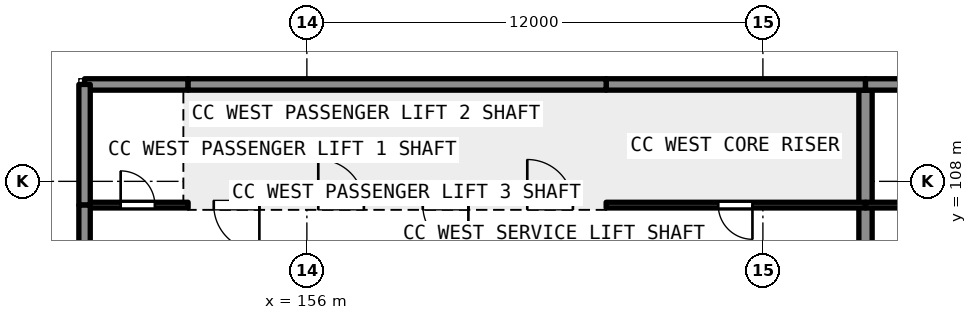
"""IFC4 building model, lengths in metres.
Left out: names, types, materials, properties, quantities, classifications, styles, units other than length and angle.
Written with IfcOpenShell. Run it as: python <this file> out.ifc"""

import sys

from ifc_helpers import new_model, si_unit, direction, frame, frame_2d, origin, place, context, subcontext, project, spatial, rectangle, extrude, element, fill, save


model = new_model("IFC4")
c1 = context("Model", 3, precision=1e-05, world=origin(), true_north=direction((0.0, 1.0)))
c2 = subcontext(c1, "Body", "Model", "MODEL_VIEW")
j1 = project(units=[si_unit("LENGTHUNIT", "METRE"), si_unit("PLANEANGLEUNIT", "RADIAN")], contexts=[c1])
p1 = place(None, origin())
s1 = spatial("IfcSite", under=j1, at=p1, CompositionType="ELEMENT")
p2 = place(p1, origin())
s2 = spatial("IfcBuilding", under=s1, at=p2, CompositionType="ELEMENT")
p3 = place(p2, frame((0.0, 0.0, 15.0)))
s3 = spatial("IfcBuildingStorey", under=s2, at=p3, CompositionType="ELEMENT", Elevation=15.0)
p4 = place(p3, frame((170.7, 103.15, 0.0), z_axis=(0.0, 0.0, 1.0), x_axis=(0.0, 1.0, 0.0)))
e1 = element("IfcWall", 1, at=p4, inside=s3, PredefinedType="SHEAR", context=c2, shape_type="SweptSolid", body=[
    extrude(rectangle(XDim=7.25, YDim=0.35, at=frame_2d((3.625, 0.0))), origin(), (0.0, 0.0, 1.0), 4.99),
])
p5 = place(p4, frame((1.2, 0.0, 0.0)))
e2 = element("IfcOpeningElement", 2, at=p5, cuts=e1, PredefinedType="OPENING", context=c2, shape_type="SweptSolid", body=[
    extrude(rectangle(XDim=1.8, YDim=2.1, at=frame_2d((0.9, 1.05))), frame((0.0, 0.186, 0.0), z_axis=(0.0, -1.0, 0.0), x_axis=(1.0, 0.0, 0.0)), (0.0, 0.0, 1.0), 0.371),
])
p6 = place(p2, origin())
s4 = spatial("IfcBuildingStorey", under=s2, at=p6, CompositionType="ELEMENT", Elevation=0.0)
for number, where, z_axis, x_axis in (
    (3, (152.875, 107.375, -1.2), (0.0, 0.0, 1.0), (0.0, 1.0, 0.0)),
    (4, (155.625, 107.375, -1.2), (0.0, 0.0, 1.0), (0.0, 1.0, 0.0)),
    (5, (158.375, 107.375, -1.2), (0.0, 0.0, 1.0), (0.0, 1.0, 0.0)),
    (6, (161.125, 107.375, -1.2), (0.0, 0.0, 1.0), (0.0, 1.0, 0.0)),
    (7, (163.875, 107.375, -1.2), (0.0, 0.0, 1.0), (0.0, 1.0, 0.0)),
):
    element("IfcWall", number, at=place(p6, frame(where, z_axis=z_axis, x_axis=x_axis)), inside=s4, PredefinedType="SHEAR", context=c2, shape_type="SweptSolid", body=[
        extrude(rectangle(XDim=3.025, YDim=0.25, at=frame_2d((1.512, 0.0))), origin(), (0.0, 0.0, 1.0), 30.79),
    ])
p7 = place(p6, frame((163.875, 107.375, -1.2), z_axis=(0.0, 0.0, 1.0), x_axis=(-1.0, 0.0, 0.0)))
e8 = element("IfcWall", 8, at=p7, inside=s4, PredefinedType="SHEAR", context=c2, shape_type="SweptSolid", body=[
    extrude(rectangle(XDim=11.0, YDim=0.25, at=frame_2d((5.5, 0.0))), origin(), (0.0, 0.0, 1.0), 30.79),
])
p8 = place(p7, frame((9.125, 0.0, 1.2)))
e9 = element("IfcOpeningElement", 9, at=p8, cuts=e8, PredefinedType="OPENING", context=c2, shape_type="SweptSolid", body=[
    extrude(rectangle(XDim=1.2, YDim=2.1, at=frame_2d((0.6, 1.05))), frame((0.0, 0.135, 0.0), z_axis=(0.0, -1.0, 0.0), x_axis=(1.0, 0.0, 0.0)), (0.0, 0.0, 1.0), 0.271),
])
p9 = place(p7, frame((6.375, 0.0, 1.2)))
e10 = element("IfcOpeningElement", 10, at=p9, cuts=e8, PredefinedType="OPENING", context=c2, shape_type="SweptSolid", body=[
    extrude(rectangle(XDim=1.2, YDim=2.1, at=frame_2d((0.6, 1.05))), frame((0.0, 0.135, 0.0), z_axis=(0.0, -1.0, 0.0), x_axis=(1.0, 0.0, 0.0)), (0.0, 0.0, 1.0), 0.271),
])
p10 = place(p7, frame((3.625, 0.0, 1.2)))
e11 = element("IfcOpeningElement", 11, at=p10, cuts=e8, PredefinedType="OPENING", context=c2, shape_type="SweptSolid", body=[
    extrude(rectangle(XDim=1.2, YDim=2.1, at=frame_2d((0.6, 1.05))), frame((0.0, 0.135, 0.0), z_axis=(0.0, -1.0, 0.0), x_axis=(1.0, 0.0, 0.0)), (0.0, 0.0, 1.0), 0.271),
])
p11 = place(p7, frame((0.875, 0.0, 1.2)))
e12 = element("IfcOpeningElement", 12, at=p11, cuts=e8, PredefinedType="OPENING", context=c2, shape_type="SweptSolid", body=[
    extrude(rectangle(XDim=1.2, YDim=2.1, at=frame_2d((0.6, 1.05))), frame((0.0, 0.135, 0.0), z_axis=(0.0, -1.0, 0.0), x_axis=(1.0, 0.0, 0.0)), (0.0, 0.0, 1.0), 0.271),
])
p12 = place(p7, frame((9.125, 0.0, 10.2)))
e13 = element("IfcOpeningElement", 13, at=p12, cuts=e8, PredefinedType="OPENING", context=c2, shape_type="SweptSolid", body=[
    extrude(rectangle(XDim=1.2, YDim=2.1, at=frame_2d((0.6, 1.05))), frame((0.0, 0.135, 0.0), z_axis=(0.0, -1.0, 0.0), x_axis=(1.0, 0.0, 0.0)), (0.0, 0.0, 1.0), 0.271),
])
p13 = place(p7, frame((6.375, 0.0, 10.2)))
e14 = element("IfcOpeningElement", 14, at=p13, cuts=e8, PredefinedType="OPENING", context=c2, shape_type="SweptSolid", body=[
    extrude(rectangle(XDim=1.2, YDim=2.1, at=frame_2d((0.6, 1.05))), frame((0.0, 0.135, 0.0), z_axis=(0.0, -1.0, 0.0), x_axis=(1.0, 0.0, 0.0)), (0.0, 0.0, 1.0), 0.271),
])
p14 = place(p7, frame((3.625, 0.0, 10.2)))
e15 = element("IfcOpeningElement", 15, at=p14, cuts=e8, PredefinedType="OPENING", context=c2, shape_type="SweptSolid", body=[
    extrude(rectangle(XDim=1.2, YDim=2.1, at=frame_2d((0.6, 1.05))), frame((0.0, 0.135, 0.0), z_axis=(0.0, -1.0, 0.0), x_axis=(1.0, 0.0, 0.0)), (0.0, 0.0, 1.0), 0.271),
])
p15 = place(p7, frame((0.875, 0.0, 10.2)))
e16 = element("IfcOpeningElement", 16, at=p15, cuts=e8, PredefinedType="OPENING", context=c2, shape_type="SweptSolid", body=[
    extrude(rectangle(XDim=1.2, YDim=2.1, at=frame_2d((0.6, 1.05))), frame((0.0, 0.135, 0.0), z_axis=(0.0, -1.0, 0.0), x_axis=(1.0, 0.0, 0.0)), (0.0, 0.0, 1.0), 0.271),
])
p16 = place(p7, frame((9.125, 0.0, 16.2)))
e17 = element("IfcOpeningElement", 17, at=p16, cuts=e8, PredefinedType="OPENING", context=c2, shape_type="SweptSolid", body=[
    extrude(rectangle(XDim=1.2, YDim=2.1, at=frame_2d((0.6, 1.05))), frame((0.0, 0.135, 0.0), z_axis=(0.0, -1.0, 0.0), x_axis=(1.0, 0.0, 0.0)), (0.0, 0.0, 1.0), 0.271),
])
p17 = place(p7, frame((6.375, 0.0, 16.2)))
e18 = element("IfcOpeningElement", 18, at=p17, cuts=e8, PredefinedType="OPENING", context=c2, shape_type="SweptSolid", body=[
    extrude(rectangle(XDim=1.2, YDim=2.1, at=frame_2d((0.6, 1.05))), frame((0.0, 0.135, 0.0), z_axis=(0.0, -1.0, 0.0), x_axis=(1.0, 0.0, 0.0)), (0.0, 0.0, 1.0), 0.271),
])
p18 = place(p7, frame((3.625, 0.0, 16.2)))
e19 = element("IfcOpeningElement", 19, at=p18, cuts=e8, PredefinedType="OPENING", context=c2, shape_type="SweptSolid", body=[
    extrude(rectangle(XDim=1.2, YDim=2.1, at=frame_2d((0.6, 1.05))), frame((0.0, 0.135, 0.0), z_axis=(0.0, -1.0, 0.0), x_axis=(1.0, 0.0, 0.0)), (0.0, 0.0, 1.0), 0.271),
])
p19 = place(p7, frame((0.875, 0.0, 16.2)))
e20 = element("IfcOpeningElement", 20, at=p19, cuts=e8, PredefinedType="OPENING", context=c2, shape_type="SweptSolid", body=[
    extrude(rectangle(XDim=1.2, YDim=2.1, at=frame_2d((0.6, 1.05))), frame((0.0, 0.135, 0.0), z_axis=(0.0, -1.0, 0.0), x_axis=(1.0, 0.0, 0.0)), (0.0, 0.0, 1.0), 0.271),
])
p20 = place(p7, frame((9.125, 0.0, 21.6)))
e21 = element("IfcOpeningElement", 21, at=p20, cuts=e8, PredefinedType="OPENING", context=c2, shape_type="SweptSolid", body=[
    extrude(rectangle(XDim=1.2, YDim=2.1, at=frame_2d((0.6, 1.05))), frame((0.0, 0.135, 0.0), z_axis=(0.0, -1.0, 0.0), x_axis=(1.0, 0.0, 0.0)), (0.0, 0.0, 1.0), 0.271),
])
p21 = place(p7, frame((6.375, 0.0, 21.6)))
e22 = element("IfcOpeningElement", 22, at=p21, cuts=e8, PredefinedType="OPENING", context=c2, shape_type="SweptSolid", body=[
    extrude(rectangle(XDim=1.2, YDim=2.1, at=frame_2d((0.6, 1.05))), frame((0.0, 0.135, 0.0), z_axis=(0.0, -1.0, 0.0), x_axis=(1.0, 0.0, 0.0)), (0.0, 0.0, 1.0), 0.271),
])
p22 = place(p7, frame((3.625, 0.0, 21.6)))
e23 = element("IfcOpeningElement", 23, at=p22, cuts=e8, PredefinedType="OPENING", context=c2, shape_type="SweptSolid", body=[
    extrude(rectangle(XDim=1.2, YDim=2.1, at=frame_2d((0.6, 1.05))), frame((0.0, 0.135, 0.0), z_axis=(0.0, -1.0, 0.0), x_axis=(1.0, 0.0, 0.0)), (0.0, 0.0, 1.0), 0.271),
])
p23 = place(p7, frame((0.875, 0.0, 21.6)))
e24 = element("IfcOpeningElement", 24, at=p23, cuts=e8, PredefinedType="OPENING", context=c2, shape_type="SweptSolid", body=[
    extrude(rectangle(XDim=1.2, YDim=2.1, at=frame_2d((0.6, 1.05))), frame((0.0, 0.135, 0.0), z_axis=(0.0, -1.0, 0.0), x_axis=(1.0, 0.0, 0.0)), (0.0, 0.0, 1.0), 0.271),
])
p24 = place(p7, frame((9.125, 0.0, 26.6)))
e25 = element("IfcOpeningElement", 25, at=p24, cuts=e8, PredefinedType="OPENING", context=c2, shape_type="SweptSolid", body=[
    extrude(rectangle(XDim=1.2, YDim=2.1, at=frame_2d((0.6, 1.05))), frame((0.0, 0.135, 0.0), z_axis=(0.0, -1.0, 0.0), x_axis=(1.0, 0.0, 0.0)), (0.0, 0.0, 1.0), 0.271),
])
p25 = place(p7, frame((6.375, 0.0, 26.6)))
e26 = element("IfcOpeningElement", 26, at=p25, cuts=e8, PredefinedType="OPENING", context=c2, shape_type="SweptSolid", body=[
    extrude(rectangle(XDim=1.2, YDim=2.1, at=frame_2d((0.6, 1.05))), frame((0.0, 0.135, 0.0), z_axis=(0.0, -1.0, 0.0), x_axis=(1.0, 0.0, 0.0)), (0.0, 0.0, 1.0), 0.271),
])
p26 = place(p7, frame((3.625, 0.0, 26.6)))
e27 = element("IfcOpeningElement", 27, at=p26, cuts=e8, PredefinedType="OPENING", context=c2, shape_type="SweptSolid", body=[
    extrude(rectangle(XDim=1.2, YDim=2.1, at=frame_2d((0.6, 1.05))), frame((0.0, 0.135, 0.0), z_axis=(0.0, -1.0, 0.0), x_axis=(1.0, 0.0, 0.0)), (0.0, 0.0, 1.0), 0.271),
])
p27 = place(p7, frame((0.875, 0.0, 26.6)))
e28 = element("IfcOpeningElement", 28, at=p27, cuts=e8, PredefinedType="OPENING", context=c2, shape_type="SweptSolid", body=[
    extrude(rectangle(XDim=1.2, YDim=2.1, at=frame_2d((0.6, 1.05))), frame((0.0, 0.135, 0.0), z_axis=(0.0, -1.0, 0.0), x_axis=(1.0, 0.0, 0.0)), (0.0, 0.0, 1.0), 0.271),
])
p28 = place(p6, frame((152.875, 110.275, -1.2), z_axis=(0.0, 0.0, 1.0), x_axis=(1.0, 0.0, 0.0)))
e29 = element("IfcWall", 29, at=p28, inside=s4, PredefinedType="SHEAR", context=c2, shape_type="SweptSolid", body=[
    extrude(rectangle(XDim=11.0, YDim=0.25, at=frame_2d((5.5, 0.0))), origin(), (0.0, 0.0, 1.0), 30.79),
])
p29 = place(p3, frame((150.3, 107.375, 0.0), z_axis=(0.0, 0.0, 1.0), x_axis=(1.0, 0.0, 0.0)))
e30 = element("IfcWall", 30, at=p29, inside=s3, PredefinedType="PARTITIONING", context=c2, shape_type="SweptSolid", body=[
    extrude(rectangle(XDim=2.575, YDim=0.15, at=frame_2d((1.288, 0.0))), origin(), (0.0, 0.0, 1.0), 4.99),
])
p30 = place(p29, frame((0.8, 0.0, 0.0)))
e31 = element("IfcOpeningElement", 31, at=p30, cuts=e30, PredefinedType="OPENING", context=c2, shape_type="SweptSolid", body=[
    extrude(rectangle(XDim=0.9, YDim=2.1, at=frame_2d((0.45, 1.05))), frame((0.0, 0.085, 0.0), z_axis=(0.0, -1.0, 0.0), x_axis=(1.0, 0.0, 0.0)), (0.0, 0.0, 1.0), 0.171),
])
p31 = place(p3, frame((150.15, 110.55, 0.0), z_axis=(0.0, 0.0, 1.0), x_axis=(1.0, 0.0, 0.0)))
e32 = element("IfcWall", 32, at=p31, inside=s3, PredefinedType="SOLIDWALL", context=c2, shape_type="SweptSolid", body=[
    extrude(rectangle(XDim=2.725, YDim=0.3, at=frame_2d((1.363, 0.0))), origin(), (0.0, 0.0, 1.0), 4.99),
])
p32 = place(p3, frame((150.15, 107.375, 0.0), z_axis=(0.0, 0.0, 1.0), x_axis=(0.0, 1.0, 0.0)))
e33 = element("IfcWall", 33, at=p32, inside=s3, PredefinedType="SOLIDWALL", context=c2, shape_type="SweptSolid", body=[
    extrude(rectangle(XDim=3.175, YDim=0.3, at=frame_2d((1.587, 0.0))), origin(), (0.0, 0.0, 1.0), 4.99),
])
p33 = place(p3, frame((163.875, 107.375, 0.0), z_axis=(0.0, 0.0, 1.0), x_axis=(1.0, 0.0, 0.0)))
e34 = element("IfcWall", 34, at=p33, inside=s3, PredefinedType="PARTITIONING", context=c2, shape_type="SweptSolid", body=[
    extrude(rectangle(XDim=6.825, YDim=0.15, at=frame_2d((3.413, 0.0))), origin(), (0.0, 0.0, 1.0), 4.99),
])
p34 = place(p33, frame((2.95, 0.0, 0.0)))
e35 = element("IfcOpeningElement", 35, at=p34, cuts=e34, PredefinedType="OPENING", context=c2, shape_type="SweptSolid", body=[
    extrude(rectangle(XDim=0.9, YDim=2.1, at=frame_2d((0.45, 1.05))), frame((0.0, 0.085, 0.0), z_axis=(0.0, -1.0, 0.0), x_axis=(1.0, 0.0, 0.0)), (0.0, 0.0, 1.0), 0.171),
])
p35 = place(p3, frame((163.875, 110.55, 0.0), z_axis=(0.0, 0.0, 1.0), x_axis=(1.0, 0.0, 0.0)))
e36 = element("IfcWall", 36, at=p35, inside=s3, PredefinedType="SOLIDWALL", context=c2, shape_type="SweptSolid", body=[
    extrude(rectangle(XDim=6.825, YDim=0.3, at=frame_2d((3.413, 0.0))), origin(), (0.0, 0.0, 1.0), 4.99),
])
p36 = place(p3, frame((150.15, 103.15, 0.0), z_axis=(0.0, 0.0, 1.0), x_axis=(0.0, 1.0, 0.0)))
e37 = element("IfcWall", 37, at=p36, inside=s3, PredefinedType="SOLIDWALL", context=c2, shape_type="SweptSolid", body=[
    extrude(rectangle(XDim=4.225, YDim=0.3, at=frame_2d((2.113, 0.0))), origin(), (0.0, 0.0, 1.0), 4.99),
])
p37 = place(p3, frame((152.875, 110.55, 0.0), z_axis=(0.0, 0.0, 1.0), x_axis=(1.0, 0.0, 0.0)))
e38 = element("IfcWall", 38, at=p37, inside=s3, PredefinedType="SOLIDWALL", context=c2, shape_type="SweptSolid", body=[
    extrude(rectangle(XDim=11.0, YDim=0.3, at=frame_2d((5.5, 0.0))), origin(), (0.0, 0.0, 1.0), 4.99),
])
p38 = place(p3, frame((170.7, 110.55, 0.0), z_axis=(0.0, 0.0, 1.0), x_axis=(1.0, 0.0, 0.0)))
e39 = element("IfcWall", 39, at=p38, inside=s3, PredefinedType="SOLIDWALL", context=c2, shape_type="SweptSolid", body=[
    extrude(rectangle(XDim=50.0, YDim=0.3, at=frame_2d((25.0, 0.0))), origin(), (0.0, 0.0, 1.0), 4.99),
])
p39 = place(p38, frame((3.7, 0.0, 0.9)))
e40 = element("IfcOpeningElement", 40, at=p39, cuts=e39, PredefinedType="OPENING", context=c2, shape_type="SweptSolid", body=[
    extrude(rectangle(XDim=2.4, YDim=1.8, at=frame_2d((1.2, 0.9))), frame((0.0, 0.161, 0.0), z_axis=(0.0, -1.0, 0.0), x_axis=(1.0, 0.0, 0.0)), (0.0, 0.0, 1.0), 0.321),
])
p40 = place(p38, frame((13.7, 0.0, 0.9)))
e41 = element("IfcOpeningElement", 41, at=p40, cuts=e39, PredefinedType="OPENING", context=c2, shape_type="SweptSolid", body=[
    extrude(rectangle(XDim=2.4, YDim=1.8, at=frame_2d((1.2, 0.9))), frame((0.0, 0.161, 0.0), z_axis=(0.0, -1.0, 0.0), x_axis=(1.0, 0.0, 0.0)), (0.0, 0.0, 1.0), 0.321),
])
p41 = place(p3, frame((209.0, 107.375, 0.0), z_axis=(0.0, 0.0, 1.0), x_axis=(-1.0, 0.0, 0.0)))
e42 = element("IfcWall", 42, at=p41, inside=s3, PredefinedType="PARTITIONING", context=c2, shape_type="SweptSolid", body=[
    extrude(rectangle(XDim=38.3, YDim=0.15, at=frame_2d((19.15, 0.0))), origin(), (0.0, 0.0, 1.0), 4.99),
])
p42 = place(p41, frame((32.85, 0.0, 0.0)))
e43 = element("IfcOpeningElement", 43, at=p42, cuts=e42, PredefinedType="OPENING", context=c2, shape_type="SweptSolid", body=[
    extrude(rectangle(XDim=1.0, YDim=2.1, at=frame_2d((0.5, 1.05))), frame((0.0, 0.085, 0.0), z_axis=(0.0, -1.0, 0.0), x_axis=(1.0, 0.0, 0.0)), (0.0, 0.0, 1.0), 0.171),
])
p43 = place(p41, frame((22.85, 0.0, 0.0)))
e44 = element("IfcOpeningElement", 44, at=p43, cuts=e42, PredefinedType="OPENING", context=c2, shape_type="SweptSolid", body=[
    extrude(rectangle(XDim=1.0, YDim=2.1, at=frame_2d((0.5, 1.05))), frame((0.0, 0.085, 0.0), z_axis=(0.0, -1.0, 0.0), x_axis=(1.0, 0.0, 0.0)), (0.0, 0.0, 1.0), 0.171),
])
p44 = place(p41, frame((13.35, 0.0, 0.0)))
e45 = element("IfcOpeningElement", 45, at=p44, cuts=e42, PredefinedType="OPENING", context=c2, shape_type="SweptSolid", body=[
    extrude(rectangle(XDim=1.0, YDim=2.1, at=frame_2d((0.5, 1.05))), frame((0.0, 0.085, 0.0), z_axis=(0.0, -1.0, 0.0), x_axis=(1.0, 0.0, 0.0)), (0.0, 0.0, 1.0), 0.171),
])
p45 = place(p41, frame((3.95, 0.0, 0.0)))
e46 = element("IfcOpeningElement", 46, at=p45, cuts=e42, PredefinedType="OPENING", context=c2, shape_type="SweptSolid", body=[
    extrude(rectangle(XDim=1.0, YDim=2.1, at=frame_2d((0.5, 1.05))), frame((0.0, 0.085, 0.0), z_axis=(0.0, -1.0, 0.0), x_axis=(1.0, 0.0, 0.0)), (0.0, 0.0, 1.0), 0.171),
])
p46 = place(p16, origin())
e47 = element("IfcDoor", 47, at=p46, inside=s3, OperationType="SLIDING_TO_LEFT", PredefinedType="DOOR", context=c2, shape_type="SweptSolid", body=[
    extrude(rectangle(XDim=1.2, YDim=2.1, at=frame_2d((0.6, 1.05))), frame((0.0, 0.025, 0.0), z_axis=(0.0, -1.0, 0.0), x_axis=(1.0, 0.0, 0.0)), (0.0, 0.0, 1.0), 0.05),
])
fill(e17, e47)
p47 = place(p17, origin())
e48 = element("IfcDoor", 48, at=p47, inside=s3, OperationType="SLIDING_TO_RIGHT", PredefinedType="DOOR", context=c2, shape_type="SweptSolid", body=[
    extrude(rectangle(XDim=1.2, YDim=2.1, at=frame_2d((0.6, 1.05))), frame((0.0, 0.025, 0.0), z_axis=(0.0, -1.0, 0.0), x_axis=(1.0, 0.0, 0.0)), (0.0, 0.0, 1.0), 0.05),
])
fill(e18, e48)
p48 = place(p18, origin())
e49 = element("IfcDoor", 49, at=p48, inside=s3, OperationType="SLIDING_TO_LEFT", PredefinedType="DOOR", context=c2, shape_type="SweptSolid", body=[
    extrude(rectangle(XDim=1.2, YDim=2.1, at=frame_2d((0.6, 1.05))), frame((0.0, 0.025, 0.0), z_axis=(0.0, -1.0, 0.0), x_axis=(1.0, 0.0, 0.0)), (0.0, 0.0, 1.0), 0.05),
])
fill(e19, e49)
p49 = place(p19, origin())
e50 = element("IfcDoor", 50, at=p49, inside=s3, OperationType="SLIDING_TO_RIGHT", PredefinedType="DOOR", context=c2, shape_type="SweptSolid", body=[
    extrude(rectangle(XDim=1.2, YDim=2.1, at=frame_2d((0.6, 1.05))), frame((0.0, 0.025, 0.0), z_axis=(0.0, -1.0, 0.0), x_axis=(1.0, 0.0, 0.0)), (0.0, 0.0, 1.0), 0.05),
])
fill(e20, e50)
p50 = place(p30, origin())
e51 = element("IfcDoor", 51, at=p50, inside=s3, OperationType="SINGLE_SWING_LEFT", PredefinedType="DOOR", context=c2, shape_type="SweptSolid", body=[
    extrude(rectangle(XDim=0.9, YDim=2.1, at=frame_2d((0.45, 1.05))), frame((0.0, 0.025, 0.0), z_axis=(0.0, -1.0, 0.0), x_axis=(1.0, 0.0, 0.0)), (0.0, 0.0, 1.0), 0.05),
])
fill(e31, e51)
p51 = place(p34, origin())
e52 = element("IfcDoor", 52, at=p51, inside=s3, OperationType="SINGLE_SWING_RIGHT", PredefinedType="DOOR", context=c2, shape_type="SweptSolid", body=[
    extrude(rectangle(XDim=0.9, YDim=2.1, at=frame_2d((0.45, 1.05))), frame((0.0, 0.025, 0.0), z_axis=(0.0, -1.0, 0.0), x_axis=(1.0, 0.0, 0.0)), (0.0, 0.0, 1.0), 0.05),
])
fill(e35, e52)
save(model, sys.argv[1])
